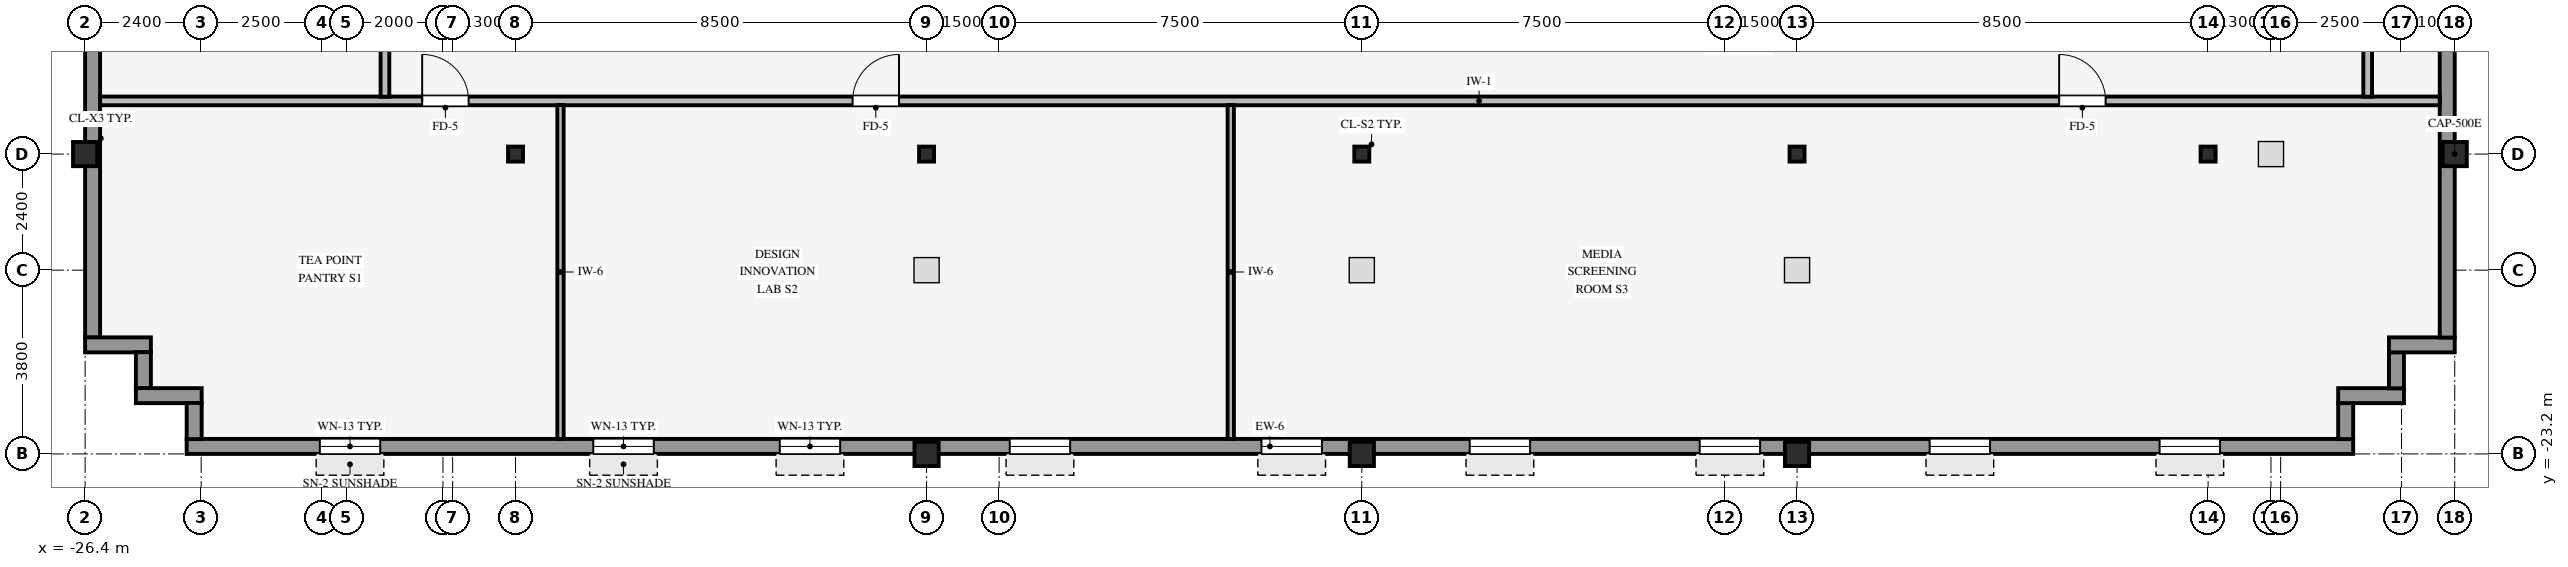
"""IFC4 building model, lengths in metres.
Left out: names, types, materials, properties, quantities, classifications, styles, units other than length and angle.
Written with IfcOpenShell. Run it as: python <this file> out.ifc"""

import sys

from ifc_helpers import new_model, si_unit, direction, frame, frame_2d, origin, origin_2d, place, context, subcontext, project, spatial, rectangle, hollow_rectangle, i_section, extrude, source, transform, mapped, element, fill, save


model = new_model("IFC4")
c1 = context("Model", 3, precision=1e-05, world=origin(), true_north=direction((0.0, 1.0)))
c2 = subcontext(c1, "Body", "Model", "MODEL_VIEW")
j1 = project(units=[si_unit("LENGTHUNIT", "METRE"), si_unit("PLANEANGLEUNIT", "RADIAN")], contexts=[c1])
p1 = place(None, origin())
s1 = spatial("IfcSite", under=j1, at=p1, CompositionType="ELEMENT")
p2 = place(p1, origin())
s2 = spatial("IfcBuilding", under=s1, at=p2, CompositionType="ELEMENT")
p3 = place(p2, frame((0.0, 0.0, 205.5)))
s3 = spatial("IfcBuildingStorey", under=s2, at=p3, CompositionType="ELEMENT", Elevation=205.5)
for number, where, z_axis, x_axis in (
    (1, (-26.4, -17.0, 0.0), (0.0, 0.0, 1.0), (1.0, 0.0, 0.0)),
    (2, (22.6, -17.0, 0.0), (0.0, 0.0, 1.0), (1.0, 0.0, 0.0)),
    (3, (-9.0, -23.2, 0.0), (0.0, 0.0, 1.0), (1.0, 0.0, 0.0)),
    (4, (0.0, -23.2, 0.0), (0.0, 0.0, 1.0), (1.0, 0.0, 0.0)),
    (5, (9.0, -23.2, 0.0), (0.0, 0.0, 1.0), (1.0, 0.0, 0.0)),
):
    element("IfcColumn", number, at=place(p3, frame(where, z_axis=z_axis, x_axis=x_axis)), inside=s3, PredefinedType="COLUMN", context=c2, shape_type="SweptSolid", body=[
        extrude(hollow_rectangle(XDim=0.5, YDim=0.5, WallThickness=0.032, InnerFilletRadius=0.032, OuterFilletRadius=0.064, at=origin_2d()), origin(), (0.0, 0.0, 1.0), 3.25),
    ])
for number, where, z_axis, x_axis in (
    (6, (0.0, -17.0, 0.0), (0.0, 0.0, 1.0), (1.0, 0.0, 0.0)),
    (7, (-17.5, -17.0, 0.0), (0.0, 0.0, 1.0), (1.0, 0.0, 0.0)),
    (8, (-9.0, -17.0, 0.0), (0.0, 0.0, 1.0), (1.0, 0.0, 0.0)),
    (9, (9.0, -17.0, 0.0), (0.0, 0.0, 1.0), (1.0, 0.0, 0.0)),
    (10, (17.5, -17.0, 0.0), (0.0, 0.0, 1.0), (1.0, 0.0, 0.0)),
):
    element("IfcColumn", number, at=place(p3, frame(where, z_axis=z_axis, x_axis=x_axis)), inside=s3, PredefinedType="COLUMN", context=c2, shape_type="SweptSolid", body=[
        extrude(i_section(OverallWidth=0.31, OverallDepth=0.31, WebThickness=0.015, FlangeThickness=0.015, FilletRadius=0.015, at=origin_2d()), origin(), (0.0, 0.0, 1.0), 3.25),
    ])
p4 = place(p3, frame((-24.3, -23.045, 0.0), z_axis=(0.0, 0.0, 1.0), x_axis=(1.0, 0.0, 0.0)))
e11 = element("IfcWall", 11, at=p4, inside=s3, PredefinedType="STANDARD", context=c2, shape_type="SweptSolid", body=[
    extrude(rectangle(XDim=44.8, YDim=0.31, at=frame_2d((22.4, 0.0))), origin(), (0.0, 0.0, 1.0), 2.792),
])
p5 = place(p4, frame((2.753, 0.0, 0.8)))
e12 = element("IfcOpeningElement", 12, at=p5, cuts=e11, PredefinedType="OPENING", context=c2, shape_type="SweptSolid", body=[
    extrude(rectangle(XDim=1.25, YDim=1.52, at=frame_2d((0.625, 0.76))), frame((0.0, 0.165, 0.0), z_axis=(0.0, -1.0, 0.0), x_axis=(1.0, 0.0, 0.0)), (0.0, 0.0, 1.0), 0.33),
])
p6 = place(p4, frame((8.408, 0.0, 0.8)))
e13 = element("IfcOpeningElement", 13, at=p6, cuts=e11, PredefinedType="OPENING", context=c2, shape_type="SweptSolid", body=[
    extrude(rectangle(XDim=1.25, YDim=1.52, at=frame_2d((0.625, 0.76))), frame((0.0, 0.165, 0.0), z_axis=(0.0, -1.0, 0.0), x_axis=(1.0, 0.0, 0.0)), (0.0, 0.0, 1.0), 0.33),
])
p7 = place(p4, frame((12.264, 0.0, 0.8)))
e14 = element("IfcOpeningElement", 14, at=p7, cuts=e11, PredefinedType="OPENING", context=c2, shape_type="SweptSolid", body=[
    extrude(rectangle(XDim=1.25, YDim=1.52, at=frame_2d((0.625, 0.76))), frame((0.0, 0.165, 0.0), z_axis=(0.0, -1.0, 0.0), x_axis=(1.0, 0.0, 0.0)), (0.0, 0.0, 1.0), 0.33),
])
p8 = place(p4, frame((17.019, 0.0, 0.8)))
e15 = element("IfcOpeningElement", 15, at=p8, cuts=e11, PredefinedType="OPENING", context=c2, shape_type="SweptSolid", body=[
    extrude(rectangle(XDim=1.25, YDim=1.52, at=frame_2d((0.625, 0.76))), frame((0.0, 0.165, 0.0), z_axis=(0.0, -1.0, 0.0), x_axis=(1.0, 0.0, 0.0)), (0.0, 0.0, 1.0), 0.33),
])
p9 = place(p4, frame((22.225, 0.0, 0.8)))
e16 = element("IfcOpeningElement", 16, at=p9, cuts=e11, PredefinedType="OPENING", context=c2, shape_type="SweptSolid", body=[
    extrude(rectangle(XDim=1.25, YDim=1.52, at=frame_2d((0.625, 0.76))), frame((0.0, 0.165, 0.0), z_axis=(0.0, -1.0, 0.0), x_axis=(1.0, 0.0, 0.0)), (0.0, 0.0, 1.0), 0.33),
])
p10 = place(p4, frame((26.531, 0.0, 0.8)))
e17 = element("IfcOpeningElement", 17, at=p10, cuts=e11, PredefinedType="OPENING", context=c2, shape_type="SweptSolid", body=[
    extrude(rectangle(XDim=1.25, YDim=1.52, at=frame_2d((0.625, 0.76))), frame((0.0, 0.165, 0.0), z_axis=(0.0, -1.0, 0.0), x_axis=(1.0, 0.0, 0.0)), (0.0, 0.0, 1.0), 0.33),
])
p11 = place(p4, frame((31.286, 0.0, 0.8)))
e18 = element("IfcOpeningElement", 18, at=p11, cuts=e11, PredefinedType="OPENING", context=c2, shape_type="SweptSolid", body=[
    extrude(rectangle(XDim=1.25, YDim=1.52, at=frame_2d((0.625, 0.76))), frame((0.0, 0.165, 0.0), z_axis=(0.0, -1.0, 0.0), x_axis=(1.0, 0.0, 0.0)), (0.0, 0.0, 1.0), 0.33),
])
p12 = place(p4, frame((36.042, 0.0, 0.8)))
e19 = element("IfcOpeningElement", 19, at=p12, cuts=e11, PredefinedType="OPENING", context=c2, shape_type="SweptSolid", body=[
    extrude(rectangle(XDim=1.25, YDim=1.52, at=frame_2d((0.625, 0.76))), frame((0.0, 0.165, 0.0), z_axis=(0.0, -1.0, 0.0), x_axis=(1.0, 0.0, 0.0)), (0.0, 0.0, 1.0), 0.33),
])
p13 = place(p4, frame((40.797, 0.0, 0.8)))
e20 = element("IfcOpeningElement", 20, at=p13, cuts=e11, PredefinedType="OPENING", context=c2, shape_type="SweptSolid", body=[
    extrude(rectangle(XDim=1.25, YDim=1.52, at=frame_2d((0.625, 0.76))), frame((0.0, 0.165, 0.0), z_axis=(0.0, -1.0, 0.0), x_axis=(1.0, 0.0, 0.0)), (0.0, 0.0, 1.0), 0.33),
])
p14 = place(p3, frame((20.345, -22.894, 0.0), z_axis=(0.0, 0.0, 1.0), x_axis=(0.0, 1.0, 0.0)))
e21 = element("IfcWall", 21, at=p14, inside=s3, PredefinedType="STANDARD", context=c2, shape_type="SweptSolid", body=[
    extrude(rectangle(XDim=0.748, YDim=0.31, at=frame_2d((0.374, 0.0))), origin(), (0.0, 0.0, 1.0), 3.24),
])
p15 = place(p3, frame((20.19, -21.995, 0.0), z_axis=(0.0, 0.0, 1.0), x_axis=(1.0, 0.0, 0.0)))
e22 = element("IfcWall", 22, at=p15, inside=s3, PredefinedType="STANDARD", context=c2, shape_type="SweptSolid", body=[
    extrude(rectangle(XDim=1.36, YDim=0.31, at=frame_2d((0.68, 0.0))), origin(), (0.0, 0.0, 1.0), 3.24),
])
p16 = place(p3, frame((21.395, -21.844, 0.0), z_axis=(0.0, 0.0, 1.0), x_axis=(0.0, 1.0, 0.0)))
e23 = element("IfcWall", 23, at=p16, inside=s3, PredefinedType="STANDARD", context=c2, shape_type="SweptSolid", body=[
    extrude(rectangle(XDim=0.748, YDim=0.31, at=frame_2d((0.374, 0.0))), origin(), (0.0, 0.0, 1.0), 3.24),
])
p17 = place(p3, frame((21.24, -20.945, 0.0), z_axis=(0.0, 0.0, 1.0), x_axis=(1.0, 0.0, 0.0)))
e24 = element("IfcWall", 24, at=p17, inside=s3, PredefinedType="STANDARD", context=c2, shape_type="SweptSolid", body=[
    extrude(rectangle(XDim=1.36, YDim=0.31, at=frame_2d((0.68, 0.0))), origin(), (0.0, 0.0, 1.0), 3.24),
])
p18 = place(p3, frame((22.445, -20.794, 0.0), z_axis=(0.0, 0.0, 1.0), x_axis=(0.0, 1.0, 0.0)))
e25 = element("IfcWall", 25, at=p18, inside=s3, PredefinedType="STANDARD", context=c2, shape_type="SweptSolid", body=[
    extrude(rectangle(XDim=37.788, YDim=0.31, at=frame_2d((18.894, 0.0))), origin(), (0.0, 0.0, 1.0), 3.24),
])
p19 = place(p18, frame((16.444, 0.0, 0.0), z_axis=(0.0, 0.0, 1.0), x_axis=(-1.0, 0.0, 0.0)))
e26 = element("IfcOpeningElement", 26, at=p19, cuts=e25, PredefinedType="OPENING", context=c2, shape_type="SweptSolid", body=[
    extrude(rectangle(XDim=1.05, YDim=2.1, at=frame_2d((0.525, 1.05))), frame((0.0, 0.165, 0.0), z_axis=(0.0, -1.0, 0.0), x_axis=(1.0, 0.0, 0.0)), (0.0, 0.0, 1.0), 0.33),
])
p20 = place(p18, frame((7.644, 0.0, 0.8)))
e27 = element("IfcOpeningElement", 27, at=p20, cuts=e25, PredefinedType="OPENING", context=c2, shape_type="SweptSolid", body=[
    extrude(rectangle(XDim=2.05, YDim=1.52, at=frame_2d((1.025, 0.76))), frame((0.0, 0.165, 0.0), z_axis=(0.0, -1.0, 0.0), x_axis=(1.0, 0.0, 0.0)), (0.0, 0.0, 1.0), 0.33),
])
p21 = place(p18, frame((12.756, 0.0, 0.8)))
e28 = element("IfcOpeningElement", 28, at=p21, cuts=e25, PredefinedType="OPENING", context=c2, shape_type="SweptSolid", body=[
    extrude(rectangle(XDim=2.05, YDim=1.52, at=frame_2d((1.025, 0.76))), frame((0.0, 0.165, 0.0), z_axis=(0.0, -1.0, 0.0), x_axis=(1.0, 0.0, 0.0)), (0.0, 0.0, 1.0), 0.33),
])
p22 = place(p18, frame((17.869, 0.0, 0.8)))
e29 = element("IfcOpeningElement", 29, at=p22, cuts=e25, PredefinedType="OPENING", context=c2, shape_type="SweptSolid", body=[
    extrude(rectangle(XDim=2.05, YDim=1.52, at=frame_2d((1.025, 0.76))), frame((0.0, 0.165, 0.0), z_axis=(0.0, -1.0, 0.0), x_axis=(1.0, 0.0, 0.0)), (0.0, 0.0, 1.0), 0.33),
])
p23 = place(p18, frame((22.982, 0.0, 0.8)))
e30 = element("IfcOpeningElement", 30, at=p23, cuts=e25, PredefinedType="OPENING", context=c2, shape_type="SweptSolid", body=[
    extrude(rectangle(XDim=2.05, YDim=1.52, at=frame_2d((1.025, 0.76))), frame((0.0, 0.165, 0.0), z_axis=(0.0, -1.0, 0.0), x_axis=(1.0, 0.0, 0.0)), (0.0, 0.0, 1.0), 0.33),
])
p24 = place(p18, frame((27.194, 0.0, 0.8)))
e31 = element("IfcOpeningElement", 31, at=p24, cuts=e25, PredefinedType="OPENING", context=c2, shape_type="SweptSolid", body=[
    extrude(rectangle(XDim=2.05, YDim=1.52, at=frame_2d((1.025, 0.76))), frame((0.0, 0.165, 0.0), z_axis=(0.0, -1.0, 0.0), x_axis=(1.0, 0.0, 0.0)), (0.0, 0.0, 1.0), 0.33),
])
p25 = place(p18, frame((33.207, 0.0, 0.8)))
e32 = element("IfcOpeningElement", 32, at=p25, cuts=e25, PredefinedType="OPENING", context=c2, shape_type="SweptSolid", body=[
    extrude(rectangle(XDim=2.05, YDim=1.52, at=frame_2d((1.025, 0.76))), frame((0.0, 0.165, 0.0), z_axis=(0.0, -1.0, 0.0), x_axis=(1.0, 0.0, 0.0)), (0.0, 0.0, 1.0), 0.33),
])
p26 = place(p3, frame((-26.245, -20.794, 0.0), z_axis=(0.0, 0.0, 1.0), x_axis=(0.0, 1.0, 0.0)))
e33 = element("IfcWall", 33, at=p26, inside=s3, PredefinedType="STANDARD", context=c2, shape_type="SweptSolid", body=[
    extrude(rectangle(XDim=37.788, YDim=0.31, at=frame_2d((18.894, 0.0))), origin(), (0.0, 0.0, 1.0), 2.585),
])
p27 = place(p26, frame((7.644, 0.0, 0.8)))
e34 = element("IfcOpeningElement", 34, at=p27, cuts=e33, PredefinedType="OPENING", context=c2, shape_type="SweptSolid", body=[
    extrude(rectangle(XDim=2.05, YDim=1.52, at=frame_2d((1.025, 0.76))), frame((0.0, 0.165, 0.0), z_axis=(0.0, -1.0, 0.0), x_axis=(1.0, 0.0, 0.0)), (0.0, 0.0, 1.0), 0.33),
])
p28 = place(p26, frame((13.206, 0.0, 0.8)))
e35 = element("IfcOpeningElement", 35, at=p28, cuts=e33, PredefinedType="OPENING", context=c2, shape_type="SweptSolid", body=[
    extrude(rectangle(XDim=2.05, YDim=1.52, at=frame_2d((1.025, 0.76))), frame((0.0, 0.165, 0.0), z_axis=(0.0, -1.0, 0.0), x_axis=(1.0, 0.0, 0.0)), (0.0, 0.0, 1.0), 0.33),
])
p29 = place(p26, frame((17.869, 0.0, 0.8)))
e36 = element("IfcOpeningElement", 36, at=p29, cuts=e33, PredefinedType="OPENING", context=c2, shape_type="SweptSolid", body=[
    extrude(rectangle(XDim=2.05, YDim=1.52, at=frame_2d((1.025, 0.76))), frame((0.0, 0.165, 0.0), z_axis=(0.0, -1.0, 0.0), x_axis=(1.0, 0.0, 0.0)), (0.0, 0.0, 1.0), 0.33),
])
p30 = place(p26, frame((22.982, 0.0, 0.8)))
e37 = element("IfcOpeningElement", 37, at=p30, cuts=e33, PredefinedType="OPENING", context=c2, shape_type="SweptSolid", body=[
    extrude(rectangle(XDim=2.05, YDim=1.52, at=frame_2d((1.025, 0.76))), frame((0.0, 0.165, 0.0), z_axis=(0.0, -1.0, 0.0), x_axis=(1.0, 0.0, 0.0)), (0.0, 0.0, 1.0), 0.33),
])
p31 = place(p26, frame((33.207, 0.0, 0.8)))
e38 = element("IfcOpeningElement", 38, at=p31, cuts=e33, PredefinedType="OPENING", context=c2, shape_type="SweptSolid", body=[
    extrude(rectangle(XDim=2.05, YDim=1.52, at=frame_2d((1.025, 0.76))), frame((0.0, 0.165, 0.0), z_axis=(0.0, -1.0, 0.0), x_axis=(1.0, 0.0, 0.0)), (0.0, 0.0, 1.0), 0.33),
])
p32 = place(p3, frame((-26.4, -20.945, 0.0), z_axis=(0.0, 0.0, 1.0), x_axis=(1.0, 0.0, 0.0)))
e39 = element("IfcWall", 39, at=p32, inside=s3, PredefinedType="STANDARD", context=c2, shape_type="SweptSolid", body=[
    extrude(rectangle(XDim=1.36, YDim=0.31, at=frame_2d((0.68, 0.0))), origin(), (0.0, 0.0, 1.0), 3.24),
])
p33 = place(p3, frame((-25.195, -21.844, 0.0), z_axis=(0.0, 0.0, 1.0), x_axis=(0.0, 1.0, 0.0)))
e40 = element("IfcWall", 40, at=p33, inside=s3, PredefinedType="STANDARD", context=c2, shape_type="SweptSolid", body=[
    extrude(rectangle(XDim=0.748, YDim=0.31, at=frame_2d((0.374, 0.0))), origin(), (0.0, 0.0, 1.0), 3.24),
])
p34 = place(p3, frame((-25.35, -21.995, 0.0), z_axis=(0.0, 0.0, 1.0), x_axis=(1.0, 0.0, 0.0)))
e41 = element("IfcWall", 41, at=p34, inside=s3, PredefinedType="STANDARD", context=c2, shape_type="SweptSolid", body=[
    extrude(rectangle(XDim=1.36, YDim=0.31, at=frame_2d((0.68, 0.0))), origin(), (0.0, 0.0, 1.0), 3.24),
])
p35 = place(p3, frame((-24.145, -22.894, 0.0), z_axis=(0.0, 0.0, 1.0), x_axis=(0.0, 1.0, 0.0)))
e42 = element("IfcWall", 42, at=p35, inside=s3, PredefinedType="STANDARD", context=c2, shape_type="SweptSolid", body=[
    extrude(rectangle(XDim=0.748, YDim=0.31, at=frame_2d((0.374, 0.0))), origin(), (0.0, 0.0, 1.0), 3.24),
])
p36 = place(p3, frame((-26.09, -15.9, 0.0), z_axis=(0.0, 0.0, 1.0), x_axis=(1.0, 0.0, 0.0)))
e43 = element("IfcWall", 43, at=p36, inside=s3, PredefinedType="PARTITIONING", context=c2, shape_type="SweptSolid", body=[
    extrude(rectangle(XDim=48.38, YDim=0.18, at=frame_2d((24.19, 0.0))), origin(), (0.0, 0.0, 1.0), 3.24),
])
p37 = place(p36, frame((15.56, 0.0, 0.0)))
e44 = element("IfcOpeningElement", 44, at=p37, cuts=e43, PredefinedType="OPENING", context=c2, shape_type="SweptSolid", body=[
    extrude(rectangle(XDim=0.96, YDim=2.1, at=frame_2d((0.48, 1.05))), frame((0.0, 0.1, 0.0), z_axis=(0.0, -1.0, 0.0), x_axis=(1.0, 0.0, 0.0)), (0.0, 0.0, 1.0), 0.2),
])
p38 = place(p36, frame((40.51, 0.0, 0.0)))
e45 = element("IfcOpeningElement", 45, at=p38, cuts=e43, PredefinedType="OPENING", context=c2, shape_type="SweptSolid", body=[
    extrude(rectangle(XDim=0.96, YDim=2.1, at=frame_2d((0.48, 1.05))), frame((0.0, 0.1, 0.0), z_axis=(0.0, -1.0, 0.0), x_axis=(1.0, 0.0, 0.0)), (0.0, 0.0, 1.0), 0.2),
])
p39 = place(p36, frame((6.66, 0.0, 0.0)))
e46 = element("IfcOpeningElement", 46, at=p39, cuts=e43, PredefinedType="OPENING", context=c2, shape_type="SweptSolid", body=[
    extrude(rectangle(XDim=0.96, YDim=2.1, at=frame_2d((0.48, 1.05))), frame((0.0, 0.1, 0.0), z_axis=(0.0, -1.0, 0.0), x_axis=(1.0, 0.0, 0.0)), (0.0, 0.0, 1.0), 0.2),
])
p40 = place(p3, frame((-20.2, -15.814, 0.0), z_axis=(0.0, 0.0, 1.0), x_axis=(0.0, 1.0, 0.0)))
e47 = element("IfcWall", 47, at=p40, inside=s3, PredefinedType="PARTITIONING", context=c2, shape_type="SweptSolid", body=[
    extrude(rectangle(XDim=31.628, YDim=0.18, at=frame_2d((15.814, 0.0))), origin(), (0.0, 0.0, 1.0), 3.24),
])
p41 = place(p40, frame((11.434, 0.0, 0.0)))
e48 = element("IfcOpeningElement", 48, at=p41, cuts=e47, PredefinedType="OPENING", context=c2, shape_type="SweptSolid", body=[
    extrude(rectangle(XDim=0.96, YDim=2.1, at=frame_2d((0.48, 1.05))), frame((0.0, 0.1, 0.0), z_axis=(0.0, -1.0, 0.0), x_axis=(1.0, 0.0, 0.0)), (0.0, 0.0, 1.0), 0.2),
])
p42 = place(p40, frame((19.634, 0.0, 0.0)))
e49 = element("IfcOpeningElement", 49, at=p42, cuts=e47, PredefinedType="OPENING", context=c2, shape_type="SweptSolid", body=[
    extrude(rectangle(XDim=0.96, YDim=2.1, at=frame_2d((0.48, 1.05))), frame((0.0, 0.1, 0.0), z_axis=(0.0, -1.0, 0.0), x_axis=(1.0, 0.0, 0.0)), (0.0, 0.0, 1.0), 0.2),
])
p43 = place(p40, frame((4.484, 0.0, 0.0)))
e50 = element("IfcOpeningElement", 50, at=p43, cuts=e47, PredefinedType="OPENING", context=c2, shape_type="SweptSolid", body=[
    extrude(rectangle(XDim=0.96, YDim=2.1, at=frame_2d((0.48, 1.05))), frame((0.0, 0.1, 0.0), z_axis=(0.0, -1.0, 0.0), x_axis=(1.0, 0.0, 0.0)), (0.0, 0.0, 1.0), 0.2),
])
p44 = place(p40, frame((26.184, 0.0, 0.0)))
e51 = element("IfcOpeningElement", 51, at=p44, cuts=e47, PredefinedType="OPENING", context=c2, shape_type="SweptSolid", body=[
    extrude(rectangle(XDim=0.96, YDim=2.1, at=frame_2d((0.48, 1.05))), frame((0.0, 0.1, 0.0), z_axis=(0.0, -1.0, 0.0), x_axis=(1.0, 0.0, 0.0)), (0.0, 0.0, 1.0), 0.2),
])
for number, where, z_axis, x_axis in (
    (52, (-16.57, -22.89, 0.0), (0.0, 0.0, 1.0), (0.0, 1.0, 0.0)),
    (53, (-2.71, -22.89, 0.0), (0.0, 0.0, 1.0), (0.0, 1.0, 0.0)),
):
    element("IfcWall", number, at=place(p3, frame(where, z_axis=z_axis, x_axis=x_axis)), inside=s3, PredefinedType="PARTITIONING", context=c2, shape_type="SweptSolid", body=[
        extrude(rectangle(XDim=6.904, YDim=0.13, at=frame_2d((3.452, 0.0))), origin(), (0.0, 0.0, 1.0), 3.24),
    ])
p45 = place(p3, frame((20.8, -15.814, 0.0), z_axis=(0.0, 0.0, 1.0), x_axis=(0.0, 1.0, 0.0)))
e54 = element("IfcWall", 54, at=p45, inside=s3, PredefinedType="PARTITIONING", context=c2, shape_type="SweptSolid", body=[
    extrude(rectangle(XDim=2.228, YDim=0.18, at=frame_2d((1.114, 0.0))), origin(), (0.0, 0.0, 1.0), 3.24),
])
m1 = source(origin(), c2, "Body", "SweptSolid", [
    extrude(rectangle(XDim=1.25, YDim=1.52, at=frame_2d((0.625, 0.76))), frame((0.0, 0.03, 0.0), z_axis=(0.0, -1.0, 0.0), x_axis=(1.0, 0.0, 0.0)), (0.0, 0.0, 1.0), 0.06),
])
p46 = place(p5, origin())
e55 = element("IfcWindow", 55, at=p46, inside=s3, PartitioningType="SINGLE_PANEL", PredefinedType="WINDOW", context=c2, shape_type="MappedRepresentation", body=[
    mapped(m1, transform((0.0, 0.0, 0.0), scale=1.0)),
])
fill(e12, e55)
p47 = place(p6, origin())
e56 = element("IfcWindow", 56, at=p47, inside=s3, PartitioningType="SINGLE_PANEL", PredefinedType="WINDOW", context=c2, shape_type="MappedRepresentation", body=[
    mapped(m1, transform((0.0, 0.0, 0.0), scale=1.0)),
])
fill(e13, e56)
p48 = place(p7, origin())
e57 = element("IfcWindow", 57, at=p48, inside=s3, PartitioningType="SINGLE_PANEL", PredefinedType="WINDOW", context=c2, shape_type="MappedRepresentation", body=[
    mapped(m1, transform((0.0, 0.0, 0.0), scale=1.0)),
])
fill(e14, e57)
p49 = place(p8, origin())
e58 = element("IfcWindow", 58, at=p49, inside=s3, PartitioningType="SINGLE_PANEL", PredefinedType="WINDOW", context=c2, shape_type="MappedRepresentation", body=[
    mapped(m1, transform((0.0, 0.0, 0.0), scale=1.0)),
])
fill(e15, e58)
p50 = place(p9, origin())
e59 = element("IfcWindow", 59, at=p50, inside=s3, PartitioningType="SINGLE_PANEL", PredefinedType="WINDOW", context=c2, shape_type="MappedRepresentation", body=[
    mapped(m1, transform((0.0, 0.0, 0.0), scale=1.0)),
])
fill(e16, e59)
p51 = place(p10, origin())
e60 = element("IfcWindow", 60, at=p51, inside=s3, PartitioningType="SINGLE_PANEL", PredefinedType="WINDOW", context=c2, shape_type="MappedRepresentation", body=[
    mapped(m1, transform((0.0, 0.0, 0.0), scale=1.0)),
])
fill(e17, e60)
p52 = place(p11, origin())
e61 = element("IfcWindow", 61, at=p52, inside=s3, PartitioningType="SINGLE_PANEL", PredefinedType="WINDOW", context=c2, shape_type="MappedRepresentation", body=[
    mapped(m1, transform((0.0, 0.0, 0.0), scale=1.0)),
])
fill(e18, e61)
p53 = place(p12, origin())
e62 = element("IfcWindow", 62, at=p53, inside=s3, PartitioningType="SINGLE_PANEL", PredefinedType="WINDOW", context=c2, shape_type="MappedRepresentation", body=[
    mapped(m1, transform((0.0, 0.0, 0.0), scale=1.0)),
])
fill(e19, e62)
p54 = place(p13, origin())
e63 = element("IfcWindow", 63, at=p54, inside=s3, PartitioningType="SINGLE_PANEL", PredefinedType="WINDOW", context=c2, shape_type="MappedRepresentation", body=[
    mapped(m1, transform((0.0, 0.0, 0.0), scale=1.0)),
])
fill(e20, e63)
m2 = source(origin(), c2, "Body", "SweptSolid", [
    extrude(rectangle(XDim=0.96, YDim=2.1, at=frame_2d((0.48, 1.05))), frame((0.0, 0.025, 0.0), z_axis=(0.0, -1.0, 0.0), x_axis=(1.0, 0.0, 0.0)), (0.0, 0.0, 1.0), 0.05),
])
p55 = place(p37, origin())
e64 = element("IfcDoor", 64, at=p55, inside=s3, OperationType="SINGLE_SWING_RIGHT", PredefinedType="DOOR", context=c2, shape_type="MappedRepresentation", body=[
    mapped(m2, transform((0.0, 0.0, 0.0), scale=1.0)),
])
fill(e44, e64)
p56 = place(p38, origin())
e65 = element("IfcDoor", 65, at=p56, inside=s3, OperationType="SINGLE_SWING_LEFT", PredefinedType="DOOR", context=c2, shape_type="MappedRepresentation", body=[
    mapped(m2, transform((0.0, 0.0, 0.0), scale=1.0)),
])
fill(e45, e65)
p57 = place(p39, origin())
e66 = element("IfcDoor", 66, at=p57, inside=s3, OperationType="SINGLE_SWING_LEFT", PredefinedType="DOOR", context=c2, shape_type="MappedRepresentation", body=[
    mapped(m2, transform((0.0, 0.0, 0.0), scale=1.0)),
])
fill(e46, e66)
save(model, sys.argv[1])
